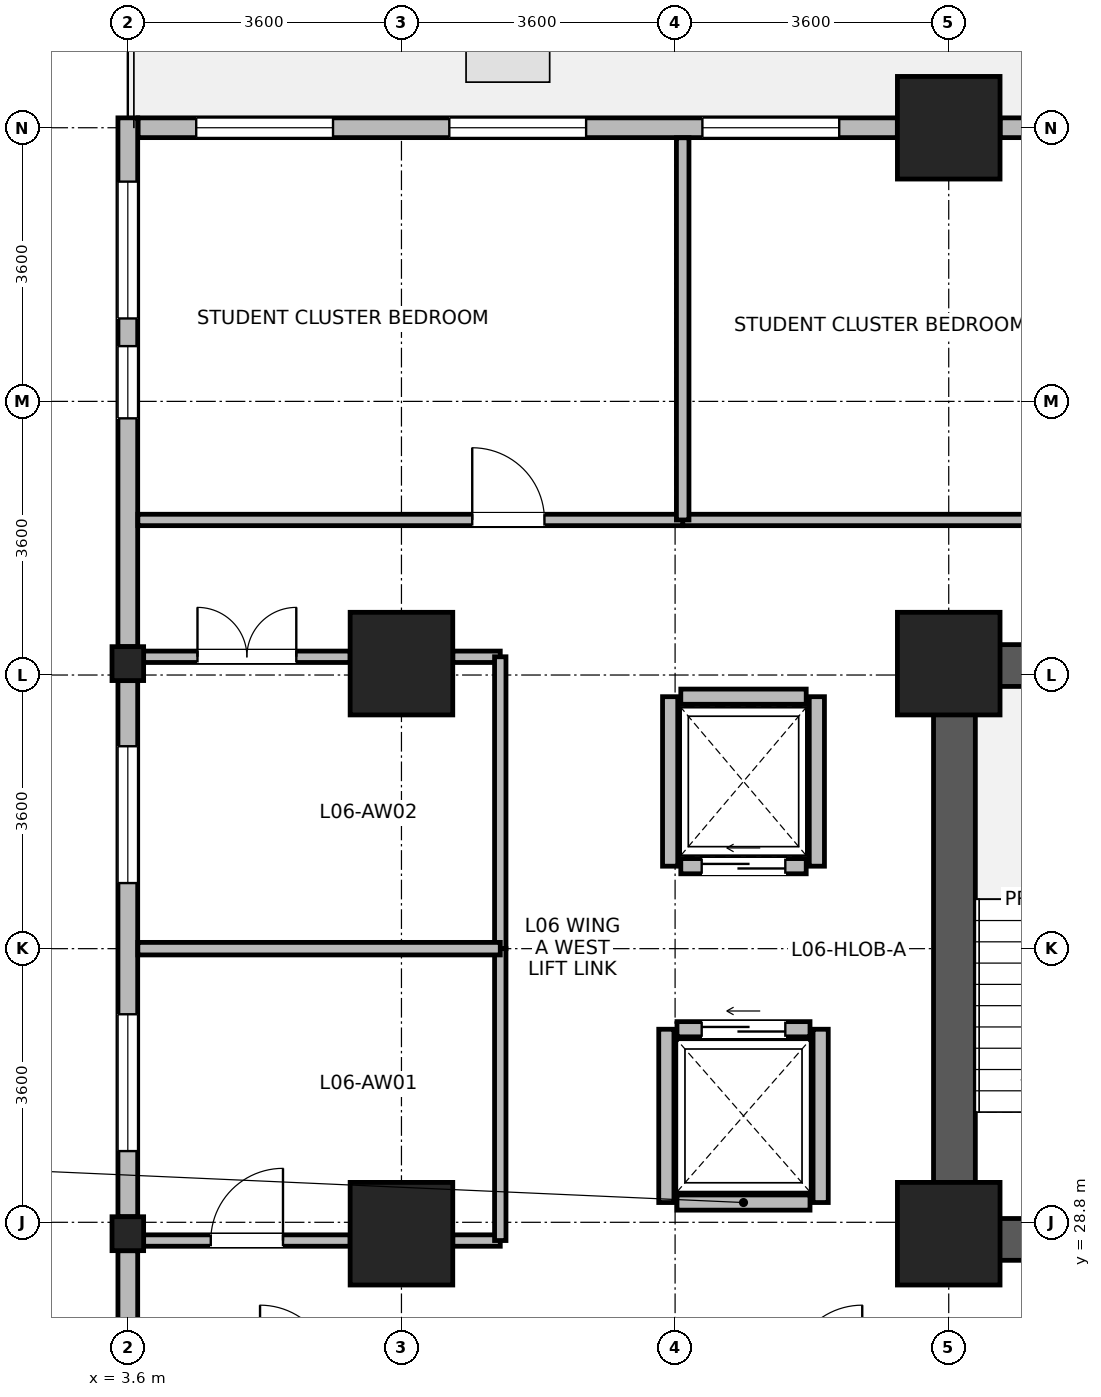
"""IFC4 building model, lengths in metres.
Left out: names, types, materials, properties, quantities, classifications, styles, units other than length and angle.
Written with IfcOpenShell. Run it as: python <this file> out.ifc"""

import sys

from ifc_helpers import new_model, si_unit, direction, frame, frame_2d, origin, origin_2d, place, context, subcontext, project, spatial, rectangle, i_section, extrude, source, transform, mapped, element, fill, save


model = new_model("IFC4")
c1 = context("Model", 3, precision=1e-05, world=origin(), true_north=direction((0.0, 1.0)))
c2 = subcontext(c1, "Body", "Model", "MODEL_VIEW")
j1 = project(units=[si_unit("LENGTHUNIT", "METRE"), si_unit("PLANEANGLEUNIT", "RADIAN")], contexts=[c1])
p1 = place(None, origin())
s1 = spatial("IfcSite", under=j1, at=p1, CompositionType="ELEMENT")
p2 = place(p1, origin())
s2 = spatial("IfcBuilding", under=s1, at=p2, CompositionType="ELEMENT")
p3 = place(p2, frame((0.0, 0.0, 29.0)))
s3 = spatial("IfcBuildingStorey", under=s2, at=p3, CompositionType="ELEMENT", Elevation=29.0)
p4 = place(p3, frame((14.475, 28.3, 0.0), z_axis=(0.0, 0.0, 1.0), x_axis=(0.0, 1.0, 0.0)))
e1 = element("IfcWall", 1, at=p4, inside=s3, PredefinedType="SHEAR", context=c2, shape_type="SweptSolid", body=[
    extrude(rectangle(XDim=8.1, YDim=0.55, at=frame_2d((4.05, 0.0))), origin(), (0.0, 0.0, 1.0), 3.45),
])
for number, where, z_axis, x_axis in (
    (2, (14.75, 28.575, 0.0), (0.0, 0.0, 1.0), (1.0, 0.0, 0.0)),
    (3, (14.75, 36.125, 0.0), (0.0, 0.0, 1.0), (1.0, 0.0, 0.0)),
):
    element("IfcWall", number, at=place(p3, frame(where, z_axis=z_axis, x_axis=x_axis)), inside=s3, PredefinedType="SHEAR", context=c2, shape_type="SweptSolid", body=[
        extrude(rectangle(XDim=3.2, YDim=0.55, at=frame_2d((1.6, 0.0))), origin(), (0.0, 0.0, 1.0), 3.45),
    ])
m1 = source(origin(), c2, "Body", "SweptSolid", [
    extrude(rectangle(XDim=1.35, YDim=1.35, at=origin_2d()), origin(), (0.0, 0.0, 1.0), 3.7),
])
for number, where, z_axis, x_axis in (
    (4, (7.2, 28.65, 0.0), (0.0, 0.0, 1.0), (1.0, 0.0, 0.0)),
    (5, (7.2, 36.15, 0.0), (0.0, 0.0, 1.0), (1.0, 0.0, 0.0)),
    (6, (14.4, 28.65, 0.0), (0.0, 0.0, 1.0), (1.0, 0.0, 0.0)),
    (7, (14.4, 36.15, 0.0), (0.0, 0.0, 1.0), (1.0, 0.0, 0.0)),
    (8, (14.4, 43.2, 0.0), (0.0, 0.0, 1.0), (1.0, 0.0, 0.0)),
):
    element("IfcColumn", number, at=place(p3, frame(where, z_axis=z_axis, x_axis=x_axis)), inside=s3, PredefinedType="COLUMN", context=c2, shape_type="MappedRepresentation", body=[
        mapped(m1, transform((0.0, 0.0, 0.0), x_axis=(1.0, 0.0, 0.0), y_axis=(0.0, 1.0, 0.0), z_axis=(0.0, 0.0, 1.0), scale=1.0)),
    ])
m2 = source(origin(), c2, "Body", "SweptSolid", [
    extrude(i_section(OverallWidth=0.416, OverallDepth=0.446, WebThickness=0.029, FlangeThickness=0.04, FilletRadius=0.015, at=origin_2d()), origin(), (0.0, 0.0, 1.0), 3.7),
])
for number, where, z_axis, x_axis in (
    (9, (3.6, 28.65, 0.0), (0.0, 0.0, 1.0), (1.0, 0.0, 0.0)),
    (10, (3.6, 36.15, 0.0), (0.0, 0.0, 1.0), (1.0, 0.0, 0.0)),
):
    element("IfcColumn", number, at=place(p3, frame(where, z_axis=z_axis, x_axis=x_axis)), inside=s3, PredefinedType="COLUMN", context=c2, shape_type="MappedRepresentation", body=[
        mapped(m2, transform((0.0, 0.0, 0.0), x_axis=(1.0, 0.0, 0.0), y_axis=(0.0, 1.0, 0.0), z_axis=(0.0, 0.0, 1.0), scale=1.0)),
    ])
p5 = place(p3, frame((15.076, 43.2, 0.0), z_axis=(0.0, 0.0, 1.0), x_axis=(1.0, 0.0, 0.0)))
e11 = element("IfcWall", 11, at=p5, inside=s3, PredefinedType="STANDARD", context=c2, shape_type="SweptSolid", body=[
    extrude(rectangle(XDim=2.715, YDim=0.26, at=frame_2d((1.357, 0.0))), origin(), (0.0, 0.0, 1.0), 2.93),
])
p6 = place(p5, frame((0.883, 0.0, 0.85)))
e12 = element("IfcOpeningElement", 12, at=p6, cuts=e11, PredefinedType="OPENING", context=c2, shape_type="SweptSolid", body=[
    extrude(rectangle(XDim=0.95, YDim=1.75, at=frame_2d((0.475, 0.875))), frame((0.0, 0.14, 0.0), z_axis=(0.0, -1.0, 0.0), x_axis=(1.0, 0.0, 0.0)), (0.0, 0.0, 1.0), 0.28),
])
p7 = place(p3, frame((3.735, 43.2, 0.0), z_axis=(0.0, 0.0, 1.0), x_axis=(1.0, 0.0, 0.0)))
e13 = element("IfcWall", 13, at=p7, inside=s3, PredefinedType="STANDARD", context=c2, shape_type="SweptSolid", body=[
    extrude(rectangle(XDim=9.989, YDim=0.26, at=frame_2d((4.995, 0.0))), origin(), (0.0, 0.0, 1.0), 3.43),
])
p8 = place(p7, frame((0.765, 0.0, 0.85)))
e14 = element("IfcOpeningElement", 14, at=p8, cuts=e13, PredefinedType="OPENING", context=c2, shape_type="SweptSolid", body=[
    extrude(rectangle(XDim=1.8, YDim=1.85, at=frame_2d((0.9, 0.925))), frame((0.0, 0.14, 0.0), z_axis=(0.0, -1.0, 0.0), x_axis=(1.0, 0.0, 0.0)), (0.0, 0.0, 1.0), 0.28),
])
p9 = place(p7, frame((4.094, 0.0, 0.85)))
e15 = element("IfcOpeningElement", 15, at=p9, cuts=e13, PredefinedType="OPENING", context=c2, shape_type="SweptSolid", body=[
    extrude(rectangle(XDim=1.8, YDim=1.85, at=frame_2d((0.9, 0.925))), frame((0.0, 0.14, 0.0), z_axis=(0.0, -1.0, 0.0), x_axis=(1.0, 0.0, 0.0)), (0.0, 0.0, 1.0), 0.28),
])
p10 = place(p7, frame((7.424, 0.0, 0.85)))
e16 = element("IfcOpeningElement", 16, at=p10, cuts=e13, PredefinedType="OPENING", context=c2, shape_type="SweptSolid", body=[
    extrude(rectangle(XDim=1.8, YDim=1.85, at=frame_2d((0.9, 0.925))), frame((0.0, 0.14, 0.0), z_axis=(0.0, -1.0, 0.0), x_axis=(1.0, 0.0, 0.0)), (0.0, 0.0, 1.0), 0.28),
])
p11 = place(p3, frame((3.6, 36.374, 0.0), z_axis=(0.0, 0.0, 1.0), x_axis=(0.0, 1.0, 0.0)))
e17 = element("IfcWall", 17, at=p11, inside=s3, PredefinedType="STANDARD", context=c2, shape_type="SweptSolid", body=[
    extrude(rectangle(XDim=6.956, YDim=0.26, at=frame_2d((3.478, 0.0))), origin(), (0.0, 0.0, 1.0), 3.43),
])
p12 = place(p11, frame((4.317, 0.0, 0.85)))
e18 = element("IfcOpeningElement", 18, at=p12, cuts=e17, PredefinedType="OPENING", context=c2, shape_type="SweptSolid", body=[
    extrude(rectangle(XDim=1.8, YDim=1.85, at=frame_2d((0.9, 0.925))), frame((0.0, 0.14, 0.0), z_axis=(0.0, -1.0, 0.0), x_axis=(1.0, 0.0, 0.0)), (0.0, 0.0, 1.0), 0.28),
])
p13 = place(p11, frame((3.003, 0.0, 0.85)))
e19 = element("IfcOpeningElement", 19, at=p13, cuts=e17, PredefinedType="OPENING", context=c2, shape_type="SweptSolid", body=[
    extrude(rectangle(XDim=0.95, YDim=1.75, at=frame_2d((0.475, 0.875))), frame((0.0, 0.14, 0.0), z_axis=(0.0, -1.0, 0.0), x_axis=(1.0, 0.0, 0.0)), (0.0, 0.0, 1.0), 0.28),
])
p14 = place(p3, frame((3.6, 28.874, 0.0), z_axis=(0.0, 0.0, 1.0), x_axis=(0.0, 1.0, 0.0)))
e20 = element("IfcWall", 20, at=p14, inside=s3, PredefinedType="STANDARD", context=c2, shape_type="SweptSolid", body=[
    extrude(rectangle(XDim=7.052, YDim=0.26, at=frame_2d((3.526, 0.0))), origin(), (0.0, 0.0, 1.0), 2.93),
])
p15 = place(p14, frame((0.863, 0.0, 0.85)))
e21 = element("IfcOpeningElement", 21, at=p15, cuts=e20, PredefinedType="OPENING", context=c2, shape_type="SweptSolid", body=[
    extrude(rectangle(XDim=1.8, YDim=1.85, at=frame_2d((0.9, 0.925))), frame((0.0, 0.14, 0.0), z_axis=(0.0, -1.0, 0.0), x_axis=(1.0, 0.0, 0.0)), (0.0, 0.0, 1.0), 0.28),
])
p16 = place(p14, frame((4.389, 0.0, 0.85)))
e22 = element("IfcOpeningElement", 22, at=p16, cuts=e20, PredefinedType="OPENING", context=c2, shape_type="SweptSolid", body=[
    extrude(rectangle(XDim=1.8, YDim=1.85, at=frame_2d((0.9, 0.925))), frame((0.0, 0.14, 0.0), z_axis=(0.0, -1.0, 0.0), x_axis=(1.0, 0.0, 0.0)), (0.0, 0.0, 1.0), 0.28),
])
p17 = place(p3, frame((3.6, 21.47, 0.0), z_axis=(0.0, 0.0, 1.0), x_axis=(0.0, 1.0, 0.0)))
e23 = element("IfcWall", 23, at=p17, inside=s3, PredefinedType="STANDARD", context=c2, shape_type="SweptSolid", body=[
    extrude(rectangle(XDim=6.956, YDim=0.26, at=frame_2d((3.478, 0.0))), origin(), (0.0, 0.0, 1.0), 3.43),
])
p18 = place(p17, frame((0.839, 0.0, 0.85)))
e24 = element("IfcOpeningElement", 24, at=p18, cuts=e23, PredefinedType="OPENING", context=c2, shape_type="SweptSolid", body=[
    extrude(rectangle(XDim=1.8, YDim=1.85, at=frame_2d((0.9, 0.925))), frame((0.0, 0.14, 0.0), z_axis=(0.0, -1.0, 0.0), x_axis=(1.0, 0.0, 0.0)), (0.0, 0.0, 1.0), 0.28),
])
p19 = place(p17, frame((3.003, 0.0, 0.85)))
e25 = element("IfcOpeningElement", 25, at=p19, cuts=e23, PredefinedType="OPENING", context=c2, shape_type="SweptSolid", body=[
    extrude(rectangle(XDim=0.95, YDim=1.75, at=frame_2d((0.475, 0.875))), frame((0.0, 0.14, 0.0), z_axis=(0.0, -1.0, 0.0), x_axis=(1.0, 0.0, 0.0)), (0.0, 0.0, 1.0), 0.28),
])
p20 = place(p3, frame((10.825, 29.06, 0.0), z_axis=(0.0, 0.0, 1.0), x_axis=(1.0, 0.0, 0.0)))
e26 = element("IfcWall", 26, at=p20, inside=s3, PredefinedType="PARTITIONING", context=c2, shape_type="SweptSolid", body=[
    extrude(rectangle(XDim=1.75, YDim=0.2, at=frame_2d((0.875, 0.0))), origin(), (0.0, 0.0, 1.0), 3.43),
])
p21 = place(p3, frame((10.825, 31.34, 0.0), z_axis=(0.0, 0.0, 1.0), x_axis=(1.0, 0.0, 0.0)))
e27 = element("IfcWall", 27, at=p21, inside=s3, PredefinedType="PARTITIONING", context=c2, shape_type="SweptSolid", body=[
    extrude(rectangle(XDim=1.75, YDim=0.2, at=frame_2d((0.875, 0.0))), origin(), (0.0, 0.0, 1.0), 3.43),
])
p22 = place(p21, frame((0.325, 0.0, 0.0)))
e28 = element("IfcOpeningElement", 28, at=p22, cuts=e27, PredefinedType="OPENING", context=c2, shape_type="SweptSolid", body=[
    extrude(rectangle(XDim=1.1, YDim=2.12, at=frame_2d((0.55, 1.06))), frame((0.0, 0.11, 0.0), z_axis=(0.0, -1.0, 0.0), x_axis=(1.0, 0.0, 0.0)), (0.0, 0.0, 1.0), 0.22),
])
for number, where, z_axis, x_axis in (
    (29, (10.685, 29.06, 0.0), (0.0, 0.0, 1.0), (0.0, 1.0, 0.0)),
    (30, (12.715, 29.06, 0.0), (0.0, 0.0, 1.0), (0.0, 1.0, 0.0)),
):
    element("IfcWall", number, at=place(p3, frame(where, z_axis=z_axis, x_axis=x_axis)), inside=s3, PredefinedType="PARTITIONING", context=c2, shape_type="SweptSolid", body=[
        extrude(rectangle(XDim=2.28, YDim=0.2, at=frame_2d((1.14, 0.0))), origin(), (0.0, 0.0, 1.0), 3.43),
    ])
p23 = place(p3, frame((10.875, 33.485, 0.0), z_axis=(0.0, 0.0, 1.0), x_axis=(1.0, 0.0, 0.0)))
e31 = element("IfcWall", 31, at=p23, inside=s3, PredefinedType="PARTITIONING", context=c2, shape_type="SweptSolid", body=[
    extrude(rectangle(XDim=1.65, YDim=0.2, at=frame_2d((0.825, 0.0))), origin(), (0.0, 0.0, 1.0), 3.43),
])
p24 = place(p23, frame((0.275, 0.0, 0.0)))
e32 = element("IfcOpeningElement", 32, at=p24, cuts=e31, PredefinedType="OPENING", context=c2, shape_type="SweptSolid", body=[
    extrude(rectangle(XDim=1.1, YDim=2.12, at=frame_2d((0.55, 1.06))), frame((0.0, 0.11, 0.0), z_axis=(0.0, -1.0, 0.0), x_axis=(1.0, 0.0, 0.0)), (0.0, 0.0, 1.0), 0.22),
])
p25 = place(p3, frame((10.875, 35.715, 0.0), z_axis=(0.0, 0.0, 1.0), x_axis=(1.0, 0.0, 0.0)))
e33 = element("IfcWall", 33, at=p25, inside=s3, PredefinedType="PARTITIONING", context=c2, shape_type="SweptSolid", body=[
    extrude(rectangle(XDim=1.65, YDim=0.2, at=frame_2d((0.825, 0.0))), origin(), (0.0, 0.0, 1.0), 3.43),
])
for number, where, z_axis, x_axis in (
    (34, (10.735, 33.485, 0.0), (0.0, 0.0, 1.0), (0.0, 1.0, 0.0)),
    (35, (12.665, 33.485, 0.0), (0.0, 0.0, 1.0), (0.0, 1.0, 0.0)),
):
    element("IfcWall", number, at=place(p3, frame(where, z_axis=z_axis, x_axis=x_axis)), inside=s3, PredefinedType="PARTITIONING", context=c2, shape_type="SweptSolid", body=[
        extrude(rectangle(XDim=2.23, YDim=0.2, at=frame_2d((1.115, 0.0))), origin(), (0.0, 0.0, 1.0), 3.43),
    ])
p26 = place(p3, frame((10.9, 38.04, 0.0), z_axis=(0.0, 0.0, 1.0), x_axis=(1.0, 0.0, 0.0)))
e36 = element("IfcWall", 36, at=p26, inside=s3, PredefinedType="PARTITIONING", context=c2, shape_type="SweptSolid", body=[
    extrude(rectangle(XDim=7.84, YDim=0.15, at=frame_2d((3.92, 0.0))), origin(), (0.0, 0.0, 1.0), 3.43),
])
p27 = place(p26, frame((4.856, 0.0, 0.0)))
e37 = element("IfcOpeningElement", 37, at=p27, cuts=e36, PredefinedType="OPENING", context=c2, shape_type="SweptSolid", body=[
    extrude(rectangle(XDim=0.95, YDim=2.1, at=frame_2d((0.475, 1.05))), frame((0.0, 0.085, 0.0), z_axis=(0.0, -1.0, 0.0), x_axis=(1.0, 0.0, 0.0)), (0.0, 0.0, 1.0), 0.17),
])
p28 = place(p3, frame((3.732, 38.04, 0.0), z_axis=(0.0, 0.0, 1.0), x_axis=(1.0, 0.0, 0.0)))
e38 = element("IfcWall", 38, at=p28, inside=s3, PredefinedType="PARTITIONING", context=c2, shape_type="SweptSolid", body=[
    extrude(rectangle(XDim=7.168, YDim=0.15, at=frame_2d((3.584, 0.0))), origin(), (0.0, 0.0, 1.0), 3.43),
])
p29 = place(p28, frame((4.399, 0.0, 0.0)))
e39 = element("IfcOpeningElement", 39, at=p29, cuts=e38, PredefinedType="OPENING", context=c2, shape_type="SweptSolid", body=[
    extrude(rectangle(XDim=0.95, YDim=2.1, at=frame_2d((0.475, 1.05))), frame((0.0, 0.085, 0.0), z_axis=(0.0, -1.0, 0.0), x_axis=(1.0, 0.0, 0.0)), (0.0, 0.0, 1.0), 0.17),
])
p30 = place(p3, frame((3.808, 28.56, 0.0), z_axis=(0.0, 0.0, 1.0), x_axis=(1.0, 0.0, 0.0)))
e40 = element("IfcWall", 40, at=p30, inside=s3, PredefinedType="PARTITIONING", context=c2, shape_type="SweptSolid", body=[
    extrude(rectangle(XDim=2.717, YDim=0.15, at=frame_2d((1.358, 0.0))), origin(), (0.0, 0.0, 1.0), 2.78),
])
p31 = place(p30, frame((0.884, 0.0, 0.0)))
e41 = element("IfcOpeningElement", 41, at=p31, cuts=e40, PredefinedType="OPENING", context=c2, shape_type="SweptSolid", body=[
    extrude(rectangle(XDim=0.95, YDim=2.1, at=frame_2d((0.475, 1.05))), frame((0.0, 0.085, 0.0), z_axis=(0.0, -1.0, 0.0), x_axis=(1.0, 0.0, 0.0)), (0.0, 0.0, 1.0), 0.17),
])
p32 = place(p3, frame((7.875, 28.56, 0.0), z_axis=(0.0, 0.0, 1.0), x_axis=(1.0, 0.0, 0.0)))
e42 = element("IfcWall", 42, at=p32, inside=s3, PredefinedType="PARTITIONING", context=c2, shape_type="SweptSolid", body=[
    extrude(rectangle(XDim=0.625, YDim=0.15, at=frame_2d((0.312, 0.0))), origin(), (0.0, 0.0, 1.0), 2.78),
])
p33 = place(p3, frame((3.808, 36.24, 0.0), z_axis=(0.0, 0.0, 1.0), x_axis=(1.0, 0.0, 0.0)))
e43 = element("IfcWall", 43, at=p33, inside=s3, PredefinedType="PARTITIONING", context=c2, shape_type="SweptSolid", body=[
    extrude(rectangle(XDim=2.717, YDim=0.15, at=frame_2d((1.358, 0.0))), origin(), (0.0, 0.0, 1.0), 2.78),
])
p34 = place(p33, frame((0.708, 0.0, 0.0)))
e44 = element("IfcOpeningElement", 44, at=p34, cuts=e43, PredefinedType="OPENING", context=c2, shape_type="SweptSolid", body=[
    extrude(rectangle(XDim=1.3, YDim=2.12, at=frame_2d((0.65, 1.06))), frame((0.0, 0.085, 0.0), z_axis=(0.0, -1.0, 0.0), x_axis=(1.0, 0.0, 0.0)), (0.0, 0.0, 1.0), 0.17),
])
p35 = place(p3, frame((7.875, 36.24, 0.0), z_axis=(0.0, 0.0, 1.0), x_axis=(1.0, 0.0, 0.0)))
e45 = element("IfcWall", 45, at=p35, inside=s3, PredefinedType="PARTITIONING", context=c2, shape_type="SweptSolid", body=[
    extrude(rectangle(XDim=0.625, YDim=0.15, at=frame_2d((0.312, 0.0))), origin(), (0.0, 0.0, 1.0), 2.78),
])
p36 = place(p3, frame((8.5, 32.4, 0.0), z_axis=(0.0, 0.0, 1.0), x_axis=(0.0, 1.0, 0.0)))
e46 = element("IfcWall", 46, at=p36, inside=s3, PredefinedType="PARTITIONING", context=c2, shape_type="SweptSolid", body=[
    extrude(rectangle(XDim=3.84, YDim=0.15, at=frame_2d((1.92, 0.0))), origin(), (0.0, 0.0, 1.0), 3.43),
])
p37 = place(p3, frame((8.5, 28.56, 0.0), z_axis=(0.0, 0.0, 1.0), x_axis=(0.0, 1.0, 0.0)))
e47 = element("IfcWall", 47, at=p37, inside=s3, PredefinedType="PARTITIONING", context=c2, shape_type="SweptSolid", body=[
    extrude(rectangle(XDim=3.84, YDim=0.15, at=frame_2d((1.92, 0.0))), origin(), (0.0, 0.0, 1.0), 3.43),
])
p38 = place(p3, frame((10.9, 38.04, 0.0), z_axis=(0.0, 0.0, 1.0), x_axis=(0.0, 1.0, 0.0)))
e48 = element("IfcWall", 48, at=p38, inside=s3, PredefinedType="PARTITIONING", context=c2, shape_type="SweptSolid", body=[
    extrude(rectangle(XDim=5.028, YDim=0.165, at=frame_2d((2.514, 0.0))), origin(), (0.0, 0.0, 1.0), 3.43),
])
p39 = place(p3, frame((3.732, 32.4, 0.0), z_axis=(0.0, 0.0, 1.0), x_axis=(1.0, 0.0, 0.0)))
e49 = element("IfcWall", 49, at=p39, inside=s3, PredefinedType="PARTITIONING", context=c2, shape_type="SweptSolid", body=[
    extrude(rectangle(XDim=4.768, YDim=0.165, at=frame_2d((2.384, 0.0))), origin(), (0.0, 0.0, 1.0), 3.43),
])
p40 = place(p8, origin())
e50 = element("IfcWindow", 50, at=p40, inside=s3, PartitioningType="SINGLE_PANEL", PredefinedType="WINDOW", context=c2, shape_type="SweptSolid", body=[
    extrude(rectangle(XDim=1.8, YDim=1.85, at=frame_2d((0.9, 0.925))), frame((0.0, 0.03, 0.0), z_axis=(0.0, -1.0, 0.0), x_axis=(1.0, 0.0, 0.0)), (0.0, 0.0, 1.0), 0.06),
])
fill(e14, e50)
p41 = place(p9, origin())
e51 = element("IfcWindow", 51, at=p41, inside=s3, PartitioningType="SINGLE_PANEL", PredefinedType="WINDOW", context=c2, shape_type="SweptSolid", body=[
    extrude(rectangle(XDim=1.8, YDim=1.85, at=frame_2d((0.9, 0.925))), frame((0.0, 0.03, 0.0), z_axis=(0.0, -1.0, 0.0), x_axis=(1.0, 0.0, 0.0)), (0.0, 0.0, 1.0), 0.06),
])
fill(e15, e51)
p42 = place(p10, origin())
e52 = element("IfcWindow", 52, at=p42, inside=s3, PartitioningType="SINGLE_PANEL", PredefinedType="WINDOW", context=c2, shape_type="SweptSolid", body=[
    extrude(rectangle(XDim=1.8, YDim=1.85, at=frame_2d((0.9, 0.925))), frame((0.0, 0.03, 0.0), z_axis=(0.0, -1.0, 0.0), x_axis=(1.0, 0.0, 0.0)), (0.0, 0.0, 1.0), 0.06),
])
fill(e16, e52)
p43 = place(p12, origin())
e53 = element("IfcWindow", 53, at=p43, inside=s3, PartitioningType="SINGLE_PANEL", PredefinedType="WINDOW", context=c2, shape_type="SweptSolid", body=[
    extrude(rectangle(XDim=1.8, YDim=1.85, at=frame_2d((0.9, 0.925))), frame((0.0, 0.03, 0.0), z_axis=(0.0, -1.0, 0.0), x_axis=(1.0, 0.0, 0.0)), (0.0, 0.0, 1.0), 0.06),
])
fill(e18, e53)
p44 = place(p13, origin())
e54 = element("IfcWindow", 54, at=p44, inside=s3, PartitioningType="SINGLE_PANEL", PredefinedType="WINDOW", context=c2, shape_type="SweptSolid", body=[
    extrude(rectangle(XDim=0.95, YDim=1.75, at=frame_2d((0.475, 0.875))), frame((0.0, 0.03, 0.0), z_axis=(0.0, -1.0, 0.0), x_axis=(1.0, 0.0, 0.0)), (0.0, 0.0, 1.0), 0.06),
])
fill(e19, e54)
p45 = place(p15, origin())
e55 = element("IfcWindow", 55, at=p45, inside=s3, PartitioningType="SINGLE_PANEL", PredefinedType="WINDOW", context=c2, shape_type="SweptSolid", body=[
    extrude(rectangle(XDim=1.8, YDim=1.85, at=frame_2d((0.9, 0.925))), frame((0.0, 0.03, 0.0), z_axis=(0.0, -1.0, 0.0), x_axis=(1.0, 0.0, 0.0)), (0.0, 0.0, 1.0), 0.06),
])
fill(e21, e55)
p46 = place(p16, origin())
e56 = element("IfcWindow", 56, at=p46, inside=s3, PartitioningType="SINGLE_PANEL", PredefinedType="WINDOW", context=c2, shape_type="SweptSolid", body=[
    extrude(rectangle(XDim=1.8, YDim=1.85, at=frame_2d((0.9, 0.925))), frame((0.0, 0.03, 0.0), z_axis=(0.0, -1.0, 0.0), x_axis=(1.0, 0.0, 0.0)), (0.0, 0.0, 1.0), 0.06),
])
fill(e22, e56)
p47 = place(p22, origin())
e57 = element("IfcDoor", 57, at=p47, inside=s3, OperationType="SLIDING_TO_LEFT", PredefinedType="DOOR", context=c2, shape_type="SweptSolid", body=[
    extrude(rectangle(XDim=1.1, YDim=2.12, at=frame_2d((0.55, 1.06))), frame((0.0, 0.025, 0.0), z_axis=(0.0, -1.0, 0.0), x_axis=(1.0, 0.0, 0.0)), (0.0, 0.0, 1.0), 0.05),
])
fill(e28, e57)
p48 = place(p24, origin())
e58 = element("IfcDoor", 58, at=p48, inside=s3, OperationType="SLIDING_TO_LEFT", PredefinedType="DOOR", context=c2, shape_type="SweptSolid", body=[
    extrude(rectangle(XDim=1.1, YDim=2.12, at=frame_2d((0.55, 1.06))), frame((0.0, 0.025, 0.0), z_axis=(0.0, -1.0, 0.0), x_axis=(1.0, 0.0, 0.0)), (0.0, 0.0, 1.0), 0.05),
])
fill(e32, e58)
p49 = place(p29, origin())
e59 = element("IfcDoor", 59, at=p49, inside=s3, OperationType="SINGLE_SWING_LEFT", PredefinedType="DOOR", context=c2, shape_type="SweptSolid", body=[
    extrude(rectangle(XDim=0.95, YDim=2.1, at=frame_2d((0.475, 1.05))), frame((0.0, 0.025, 0.0), z_axis=(0.0, -1.0, 0.0), x_axis=(1.0, 0.0, 0.0)), (0.0, 0.0, 1.0), 0.05),
])
fill(e39, e59)
p50 = place(p31, origin())
e60 = element("IfcDoor", 60, at=p50, inside=s3, OperationType="SINGLE_SWING_RIGHT", PredefinedType="DOOR", context=c2, shape_type="SweptSolid", body=[
    extrude(rectangle(XDim=0.95, YDim=2.1, at=frame_2d((0.475, 1.05))), frame((0.0, 0.025, 0.0), z_axis=(0.0, -1.0, 0.0), x_axis=(1.0, 0.0, 0.0)), (0.0, 0.0, 1.0), 0.05),
])
fill(e41, e60)
p51 = place(p34, origin())
e61 = element("IfcDoor", 61, at=p51, inside=s3, OperationType="DOUBLE_DOOR_SINGLE_SWING", PredefinedType="DOOR", context=c2, shape_type="SweptSolid", body=[
    extrude(rectangle(XDim=1.3, YDim=2.12, at=frame_2d((0.65, 1.06))), frame((0.0, 0.025, 0.0), z_axis=(0.0, -1.0, 0.0), x_axis=(1.0, 0.0, 0.0)), (0.0, 0.0, 1.0), 0.05),
])
fill(e44, e61)
save(model, sys.argv[1])
